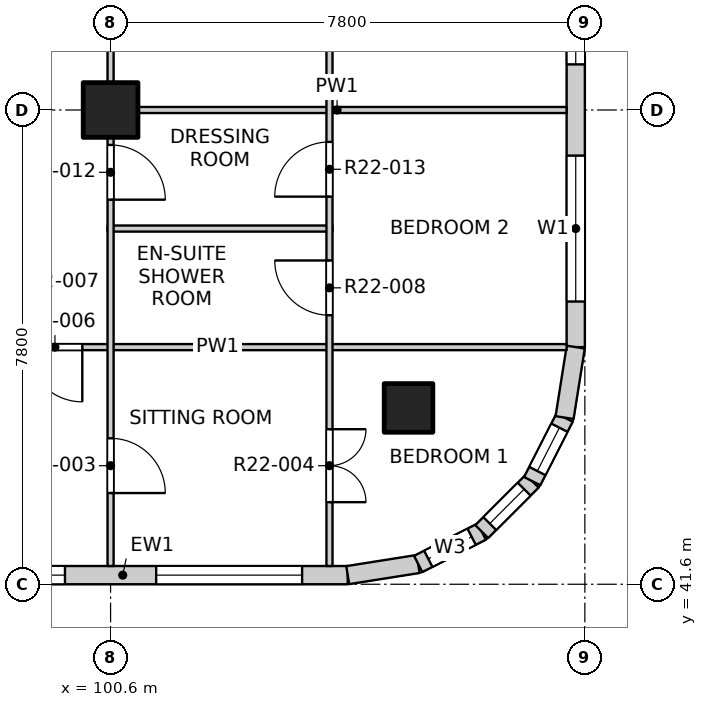
"""IFC4 building model, lengths in metres.
Left out: names, types, materials, properties, quantities, classifications, styles, units other than length and angle.
Written with IfcOpenShell. Run it as: python <this file> out.ifc"""

import sys

from ifc_helpers import new_model, si_unit, direction, frame, frame_2d, origin, origin_2d, place, context, subcontext, project, spatial, rectangle, extrude, element, fill, save


model = new_model("IFC4")
c1 = context("Model", 3, precision=1e-05, world=origin(), true_north=direction((0.0, 1.0)))
c2 = subcontext(c1, "Body", "Model", "MODEL_VIEW")
j1 = project(units=[si_unit("LENGTHUNIT", "METRE"), si_unit("PLANEANGLEUNIT", "RADIAN")], contexts=[c1])
p1 = place(None, origin())
s1 = spatial("IfcSite", under=j1, at=p1, CompositionType="ELEMENT")
p2 = place(p1, origin())
s2 = spatial("IfcBuilding", under=s1, at=p2, CompositionType="ELEMENT")
p3 = place(p2, frame((0.0, 0.0, 224.5)))
s3 = spatial("IfcBuildingStorey", under=s2, at=p3, CompositionType="ELEMENT", Elevation=224.5)
p4 = place(p3, frame((105.5, 44.5, -0.25), z_axis=(0.0, 0.0, 1.0), x_axis=(1.0, 0.0, 0.0)))
e1 = element("IfcColumn", 1, at=p4, inside=s3, PredefinedType="COLUMN", context=c2, shape_type="SweptSolid", body=[
    extrude(rectangle(XDim=0.8, YDim=0.8, at=origin_2d()), origin(), (0.0, 0.0, 1.0), 3.4),
])
p5 = place(p3, frame((100.6, 49.4, -0.25), z_axis=(0.0, 0.0, 1.0), x_axis=(1.0, 0.0, 0.0)))
e2 = element("IfcColumn", 2, at=p5, inside=s3, PredefinedType="COLUMN", context=c2, shape_type="SweptSolid", body=[
    extrude(rectangle(XDim=0.9, YDim=0.9, at=origin_2d()), origin(), (0.0, 0.0, 1.0), 3.4),
])
p6 = place(p3, frame((97.1, 41.75, 0.0), z_axis=(0.0, 0.0, 1.0), x_axis=(1.0, 0.0, 0.0)))
e3 = element("IfcWall", 3, at=p6, inside=s3, PredefinedType="SOLIDWALL", context=c2, shape_type="SweptSolid", body=[
    extrude(rectangle(XDim=7.4, YDim=0.3, at=frame_2d((3.7, 0.0))), origin(), (0.0, 0.0, 1.0), 2.7),
])
p7 = place(p6, frame((0.35, 0.0, 0.9)))
e4 = element("IfcOpeningElement", 4, at=p7, cuts=e3, PredefinedType="OPENING", context=c2, shape_type="SweptSolid", body=[
    extrude(rectangle(XDim=2.4, YDim=1.8, at=frame_2d((1.2, 0.9))), frame((0.0, 0.16, 0.0), z_axis=(0.0, -1.0, 0.0), x_axis=(1.0, 0.0, 0.0)), (0.0, 0.0, 1.0), 0.32),
])
p8 = place(p6, frame((4.25, 0.0, 0.9)))
e5 = element("IfcOpeningElement", 5, at=p8, cuts=e3, PredefinedType="OPENING", context=c2, shape_type="SweptSolid", body=[
    extrude(rectangle(XDim=2.4, YDim=1.8, at=frame_2d((1.2, 0.9))), frame((0.0, 0.16, 0.0), z_axis=(0.0, -1.0, 0.0), x_axis=(1.0, 0.0, 0.0)), (0.0, 0.0, 1.0), 0.32),
])
p9 = place(p3, frame((108.25, 45.5, 0.0), z_axis=(0.0, 0.0, 1.0), x_axis=(0.0, 1.0, 0.0)))
e6 = element("IfcWall", 6, at=p9, inside=s3, PredefinedType="SOLIDWALL", context=c2, shape_type="SweptSolid", body=[
    extrude(rectangle(XDim=7.4, YDim=0.3, at=frame_2d((3.7, 0.0))), origin(), (0.0, 0.0, 1.0), 2.7),
])
p10 = place(p9, frame((0.75, 0.0, 0.9)))
e7 = element("IfcOpeningElement", 7, at=p10, cuts=e6, PredefinedType="OPENING", context=c2, shape_type="SweptSolid", body=[
    extrude(rectangle(XDim=2.4, YDim=1.8, at=frame_2d((1.2, 0.9))), frame((0.0, 0.16, 0.0), z_axis=(0.0, -1.0, 0.0), x_axis=(1.0, 0.0, 0.0)), (0.0, 0.0, 1.0), 0.32),
])
p11 = place(p9, frame((4.65, 0.0, 0.9)))
e8 = element("IfcOpeningElement", 8, at=p11, cuts=e6, PredefinedType="OPENING", context=c2, shape_type="SweptSolid", body=[
    extrude(rectangle(XDim=2.4, YDim=1.8, at=frame_2d((1.2, 0.9))), frame((0.0, 0.16, 0.0), z_axis=(0.0, -1.0, 0.0), x_axis=(1.0, 0.0, 0.0)), (0.0, 0.0, 1.0), 0.32),
])
p12 = place(p3, frame((104.5, 41.75, 0.0), z_axis=(0.0, 0.0, 1.0), x_axis=(0.987678452879, 0.156496880861, 0.0)))
e9 = element("IfcWall", 9, at=p12, inside=s3, PredefinedType="SOLIDWALL", context=c2, shape_type="SweptSolid", body=[
    extrude(rectangle(XDim=1.173, YDim=0.3, at=frame_2d((0.586, 0.0))), origin(), (0.0, 0.0, 1.0), 2.7),
])
p13 = place(p3, frame((105.659, 41.934, 0.0), z_axis=(0.0, 0.0, 1.0), x_axis=(0.890988677504, 0.454025524128, 0.0)))
e10 = element("IfcWall", 10, at=p13, inside=s3, PredefinedType="SOLIDWALL", context=c2, shape_type="SweptSolid", body=[
    extrude(rectangle(XDim=1.173, YDim=0.3, at=frame_2d((0.587, 0.0))), origin(), (0.0, 0.0, 1.0), 2.7),
])
p14 = place(p13, frame((0.187, 0.0, 0.9)))
e11 = element("IfcOpeningElement", 11, at=p14, cuts=e10, PredefinedType="OPENING", context=c2, shape_type="SweptSolid", body=[
    extrude(rectangle(XDim=0.8, YDim=1.2, at=frame_2d((0.4, 0.6))), frame((0.0, 0.16, 0.0), z_axis=(0.0, -1.0, 0.0), x_axis=(1.0, 0.0, 0.0)), (0.0, 0.0, 1.0), 0.32),
])
p15 = place(p3, frame((106.704, 42.466, 0.0), z_axis=(0.0, 0.0, 1.0), x_axis=(0.707106781187, 0.707106781187, 0.0)))
e12 = element("IfcWall", 12, at=p15, inside=s3, PredefinedType="SOLIDWALL", context=c2, shape_type="SweptSolid", body=[
    extrude(rectangle(XDim=1.173, YDim=0.3, at=frame_2d((0.586, 0.0))), origin(), (0.0, 0.0, 1.0), 2.7),
])
p16 = place(p15, frame((0.187, 0.0, 0.9)))
e13 = element("IfcOpeningElement", 13, at=p16, cuts=e12, PredefinedType="OPENING", context=c2, shape_type="SweptSolid", body=[
    extrude(rectangle(XDim=0.8, YDim=1.2, at=frame_2d((0.4, 0.6))), frame((0.0, 0.16, 0.0), z_axis=(0.0, -1.0, 0.0), x_axis=(1.0, 0.0, 0.0)), (0.0, 0.0, 1.0), 0.32),
])
p17 = place(p3, frame((107.534, 43.296, 0.0), z_axis=(0.0, 0.0, 1.0), x_axis=(0.454025524128, 0.890988677504, 0.0)))
e14 = element("IfcWall", 14, at=p17, inside=s3, PredefinedType="SOLIDWALL", context=c2, shape_type="SweptSolid", body=[
    extrude(rectangle(XDim=1.173, YDim=0.3, at=frame_2d((0.587, 0.0))), origin(), (0.0, 0.0, 1.0), 2.7),
])
p18 = place(p17, frame((0.187, 0.0, 0.9)))
e15 = element("IfcOpeningElement", 15, at=p18, cuts=e14, PredefinedType="OPENING", context=c2, shape_type="SweptSolid", body=[
    extrude(rectangle(XDim=0.8, YDim=1.2, at=frame_2d((0.4, 0.6))), frame((0.0, 0.16, 0.0), z_axis=(0.0, -1.0, 0.0), x_axis=(1.0, 0.0, 0.0)), (0.0, 0.0, 1.0), 0.32),
])
p19 = place(p3, frame((108.066, 44.341, 0.0), z_axis=(0.0, 0.0, 1.0), x_axis=(0.156496880861, 0.987678452879, 0.0)))
e16 = element("IfcWall", 16, at=p19, inside=s3, PredefinedType="SOLIDWALL", context=c2, shape_type="SweptSolid", body=[
    extrude(rectangle(XDim=1.173, YDim=0.3, at=frame_2d((0.586, 0.0))), origin(), (0.0, 0.0, 1.0), 2.7),
])
p20 = place(p3, frame((96.625, 45.5, 0.0), z_axis=(0.0, 0.0, 1.0), x_axis=(1.0, 0.0, 0.0)))
e17 = element("IfcWall", 17, at=p20, inside=s3, PredefinedType="PARTITIONING", context=c2, shape_type="SweptSolid", body=[
    extrude(rectangle(XDim=11.475, YDim=0.1, at=frame_2d((5.738, 0.0))), origin(), (0.0, 0.0, 1.0), 3.15),
])
p21 = place(p20, frame((2.61, 0.0, 0.0)))
e18 = element("IfcOpeningElement", 18, at=p21, cuts=e17, PredefinedType="OPENING", context=c2, shape_type="SweptSolid", body=[
    extrude(rectangle(XDim=0.9, YDim=2.1, at=frame_2d((0.45, 1.05))), frame((0.0, 0.06, 0.0), z_axis=(0.0, -1.0, 0.0), x_axis=(1.0, 0.0, 0.0)), (0.0, 0.0, 1.0), 0.12),
])
p22 = place(p3, frame((100.55, 47.45, 0.0), z_axis=(0.0, 0.0, 1.0), x_axis=(1.0, 0.0, 0.0)))
e19 = element("IfcWall", 19, at=p22, inside=s3, PredefinedType="PARTITIONING", context=c2, shape_type="SweptSolid", body=[
    extrude(rectangle(XDim=3.7, YDim=0.1, at=frame_2d((1.85, 0.0))), origin(), (0.0, 0.0, 1.0), 3.15),
])
p23 = place(p3, frame((100.55, 49.4, 0.0), z_axis=(0.0, 0.0, 1.0), x_axis=(1.0, 0.0, 0.0)))
e20 = element("IfcWall", 20, at=p23, inside=s3, PredefinedType="PARTITIONING", context=c2, shape_type="SweptSolid", body=[
    extrude(rectangle(XDim=7.55, YDim=0.1, at=frame_2d((3.775, 0.0))), origin(), (0.0, 0.0, 1.0), 3.15),
])
p24 = place(p3, frame((100.6, 41.9, 0.0), z_axis=(0.0, 0.0, 1.0), x_axis=(0.0, 1.0, 0.0)))
e21 = element("IfcWall", 21, at=p24, inside=s3, PredefinedType="PARTITIONING", context=c2, shape_type="SweptSolid", body=[
    extrude(rectangle(XDim=46.2, YDim=0.1, at=frame_2d((23.1, 0.0))), origin(), (0.0, 0.0, 1.0), 3.15),
])
p25 = place(p24, frame((1.2, 0.0, 0.0)))
e22 = element("IfcOpeningElement", 22, at=p25, cuts=e21, PredefinedType="OPENING", context=c2, shape_type="SweptSolid", body=[
    extrude(rectangle(XDim=0.9, YDim=2.1, at=frame_2d((0.45, 1.05))), frame((0.0, 0.06, 0.0), z_axis=(0.0, -1.0, 0.0), x_axis=(1.0, 0.0, 0.0)), (0.0, 0.0, 1.0), 0.12),
])
p26 = place(p24, frame((6.025, 0.0, 0.0)))
e23 = element("IfcOpeningElement", 23, at=p26, cuts=e21, PredefinedType="OPENING", context=c2, shape_type="SweptSolid", body=[
    extrude(rectangle(XDim=0.9, YDim=2.1, at=frame_2d((0.45, 1.05))), frame((0.0, 0.06, 0.0), z_axis=(0.0, -1.0, 0.0), x_axis=(1.0, 0.0, 0.0)), (0.0, 0.0, 1.0), 0.12),
])
p27 = place(p24, frame((9.0, 0.0, 0.0)))
e24 = element("IfcOpeningElement", 24, at=p27, cuts=e21, PredefinedType="OPENING", context=c2, shape_type="SweptSolid", body=[
    extrude(rectangle(XDim=0.9, YDim=2.1, at=frame_2d((0.45, 1.05))), frame((0.0, 0.06, 0.0), z_axis=(0.0, -1.0, 0.0), x_axis=(1.0, 0.0, 0.0)), (0.0, 0.0, 1.0), 0.12),
])
p28 = place(p24, frame((12.9, 0.0, 0.0)))
e25 = element("IfcOpeningElement", 25, at=p28, cuts=e21, PredefinedType="OPENING", context=c2, shape_type="SweptSolid", body=[
    extrude(rectangle(XDim=0.9, YDim=2.1, at=frame_2d((0.45, 1.05))), frame((0.0, 0.06, 0.0), z_axis=(0.0, -1.0, 0.0), x_axis=(1.0, 0.0, 0.0)), (0.0, 0.0, 1.0), 0.12),
])
p29 = place(p24, frame((17.775, 0.0, 0.0)))
e26 = element("IfcOpeningElement", 26, at=p29, cuts=e21, PredefinedType="OPENING", context=c2, shape_type="SweptSolid", body=[
    extrude(rectangle(XDim=0.9, YDim=2.1, at=frame_2d((0.45, 1.05))), frame((0.0, 0.06, 0.0), z_axis=(0.0, -1.0, 0.0), x_axis=(1.0, 0.0, 0.0)), (0.0, 0.0, 1.0), 0.12),
])
p30 = place(p24, frame((21.625, 0.0, 0.0)))
e27 = element("IfcOpeningElement", 27, at=p30, cuts=e21, PredefinedType="OPENING", context=c2, shape_type="SweptSolid", body=[
    extrude(rectangle(XDim=0.9, YDim=2.1, at=frame_2d((0.45, 1.05))), frame((0.0, 0.06, 0.0), z_axis=(0.0, -1.0, 0.0), x_axis=(1.0, 0.0, 0.0)), (0.0, 0.0, 1.0), 0.12),
])
p31 = place(p24, frame((25.575, 0.0, 0.0)))
e28 = element("IfcOpeningElement", 28, at=p31, cuts=e21, PredefinedType="OPENING", context=c2, shape_type="SweptSolid", body=[
    extrude(rectangle(XDim=0.9, YDim=2.1, at=frame_2d((0.45, 1.05))), frame((0.0, 0.06, 0.0), z_axis=(0.0, -1.0, 0.0), x_axis=(1.0, 0.0, 0.0)), (0.0, 0.0, 1.0), 0.12),
])
p32 = place(p24, frame((28.5, 0.0, 0.0)))
e29 = element("IfcOpeningElement", 29, at=p32, cuts=e21, PredefinedType="OPENING", context=c2, shape_type="SweptSolid", body=[
    extrude(rectangle(XDim=0.9, YDim=2.1, at=frame_2d((0.45, 1.05))), frame((0.0, 0.06, 0.0), z_axis=(0.0, -1.0, 0.0), x_axis=(1.0, 0.0, 0.0)), (0.0, 0.0, 1.0), 0.12),
])
p33 = place(p24, frame((33.375, 0.0, 0.0)))
e30 = element("IfcOpeningElement", 30, at=p33, cuts=e21, PredefinedType="OPENING", context=c2, shape_type="SweptSolid", body=[
    extrude(rectangle(XDim=0.9, YDim=2.1, at=frame_2d((0.45, 1.05))), frame((0.0, 0.06, 0.0), z_axis=(0.0, -1.0, 0.0), x_axis=(1.0, 0.0, 0.0)), (0.0, 0.0, 1.0), 0.12),
])
p34 = place(p24, frame((36.3, 0.0, 0.0)))
e31 = element("IfcOpeningElement", 31, at=p34, cuts=e21, PredefinedType="OPENING", context=c2, shape_type="SweptSolid", body=[
    extrude(rectangle(XDim=0.9, YDim=2.1, at=frame_2d((0.45, 1.05))), frame((0.0, 0.06, 0.0), z_axis=(0.0, -1.0, 0.0), x_axis=(1.0, 0.0, 0.0)), (0.0, 0.0, 1.0), 0.12),
])
p35 = place(p24, frame((40.2, 0.0, 0.0)))
e32 = element("IfcOpeningElement", 32, at=p35, cuts=e21, PredefinedType="OPENING", context=c2, shape_type="SweptSolid", body=[
    extrude(rectangle(XDim=0.9, YDim=2.1, at=frame_2d((0.45, 1.05))), frame((0.0, 0.06, 0.0), z_axis=(0.0, -1.0, 0.0), x_axis=(1.0, 0.0, 0.0)), (0.0, 0.0, 1.0), 0.12),
])
p36 = place(p24, frame((44.1, 0.0, 0.0)))
e33 = element("IfcOpeningElement", 33, at=p36, cuts=e21, PredefinedType="OPENING", context=c2, shape_type="SweptSolid", body=[
    extrude(rectangle(XDim=0.9, YDim=2.1, at=frame_2d((0.45, 1.05))), frame((0.0, 0.06, 0.0), z_axis=(0.0, -1.0, 0.0), x_axis=(1.0, 0.0, 0.0)), (0.0, 0.0, 1.0), 0.12),
])
p37 = place(p3, frame((104.2, 41.9, 0.0), z_axis=(0.0, 0.0, 1.0), x_axis=(0.0, 1.0, 0.0)))
e34 = element("IfcWall", 34, at=p37, inside=s3, PredefinedType="PARTITIONING", context=c2, shape_type="SweptSolid", body=[
    extrude(rectangle(XDim=34.7, YDim=0.1, at=frame_2d((17.35, 0.0))), origin(), (0.0, 0.0, 1.0), 3.15),
])
p38 = place(p37, frame((1.05, 0.0, 0.0)))
e35 = element("IfcOpeningElement", 35, at=p38, cuts=e34, PredefinedType="OPENING", context=c2, shape_type="SweptSolid", body=[
    extrude(rectangle(XDim=1.2, YDim=2.1, at=frame_2d((0.6, 1.05))), frame((0.0, 0.06, 0.0), z_axis=(0.0, -1.0, 0.0), x_axis=(1.0, 0.0, 0.0)), (0.0, 0.0, 1.0), 0.12),
])
p39 = place(p37, frame((4.125, 0.0, 0.0)))
e36 = element("IfcOpeningElement", 36, at=p39, cuts=e34, PredefinedType="OPENING", context=c2, shape_type="SweptSolid", body=[
    extrude(rectangle(XDim=0.9, YDim=2.1, at=frame_2d((0.45, 1.05))), frame((0.0, 0.06, 0.0), z_axis=(0.0, -1.0, 0.0), x_axis=(1.0, 0.0, 0.0)), (0.0, 0.0, 1.0), 0.12),
])
p40 = place(p37, frame((6.075, 0.0, 0.0)))
e37 = element("IfcOpeningElement", 37, at=p40, cuts=e34, PredefinedType="OPENING", context=c2, shape_type="SweptSolid", body=[
    extrude(rectangle(XDim=0.9, YDim=2.1, at=frame_2d((0.45, 1.05))), frame((0.0, 0.06, 0.0), z_axis=(0.0, -1.0, 0.0), x_axis=(1.0, 0.0, 0.0)), (0.0, 0.0, 1.0), 0.12),
])
p41 = place(p37, frame((8.85, 0.0, 0.0)))
e38 = element("IfcOpeningElement", 38, at=p41, cuts=e34, PredefinedType="OPENING", context=c2, shape_type="SweptSolid", body=[
    extrude(rectangle(XDim=1.2, YDim=2.1, at=frame_2d((0.6, 1.05))), frame((0.0, 0.06, 0.0), z_axis=(0.0, -1.0, 0.0), x_axis=(1.0, 0.0, 0.0)), (0.0, 0.0, 1.0), 0.12),
])
p42 = place(p37, frame((12.75, 0.0, 0.0)))
e39 = element("IfcOpeningElement", 39, at=p42, cuts=e34, PredefinedType="OPENING", context=c2, shape_type="SweptSolid", body=[
    extrude(rectangle(XDim=1.2, YDim=2.1, at=frame_2d((0.6, 1.05))), frame((0.0, 0.06, 0.0), z_axis=(0.0, -1.0, 0.0), x_axis=(1.0, 0.0, 0.0)), (0.0, 0.0, 1.0), 0.12),
])
p43 = place(p37, frame((15.825, 0.0, 0.0)))
e40 = element("IfcOpeningElement", 40, at=p43, cuts=e34, PredefinedType="OPENING", context=c2, shape_type="SweptSolid", body=[
    extrude(rectangle(XDim=0.9, YDim=2.1, at=frame_2d((0.45, 1.05))), frame((0.0, 0.06, 0.0), z_axis=(0.0, -1.0, 0.0), x_axis=(1.0, 0.0, 0.0)), (0.0, 0.0, 1.0), 0.12),
])
p44 = place(p37, frame((17.775, 0.0, 0.0)))
e41 = element("IfcOpeningElement", 41, at=p44, cuts=e34, PredefinedType="OPENING", context=c2, shape_type="SweptSolid", body=[
    extrude(rectangle(XDim=0.9, YDim=2.1, at=frame_2d((0.45, 1.05))), frame((0.0, 0.06, 0.0), z_axis=(0.0, -1.0, 0.0), x_axis=(1.0, 0.0, 0.0)), (0.0, 0.0, 1.0), 0.12),
])
p45 = place(p37, frame((19.725, 0.0, 0.0)))
e42 = element("IfcOpeningElement", 42, at=p45, cuts=e34, PredefinedType="OPENING", context=c2, shape_type="SweptSolid", body=[
    extrude(rectangle(XDim=0.9, YDim=2.1, at=frame_2d((0.45, 1.05))), frame((0.0, 0.06, 0.0), z_axis=(0.0, -1.0, 0.0), x_axis=(1.0, 0.0, 0.0)), (0.0, 0.0, 1.0), 0.12),
])
p46 = place(p37, frame((21.675, 0.0, 0.0)))
e43 = element("IfcOpeningElement", 43, at=p46, cuts=e34, PredefinedType="OPENING", context=c2, shape_type="SweptSolid", body=[
    extrude(rectangle(XDim=0.9, YDim=2.1, at=frame_2d((0.45, 1.05))), frame((0.0, 0.06, 0.0), z_axis=(0.0, -1.0, 0.0), x_axis=(1.0, 0.0, 0.0)), (0.0, 0.0, 1.0), 0.12),
])
p47 = place(p37, frame((23.625, 0.0, 0.0)))
e44 = element("IfcOpeningElement", 44, at=p47, cuts=e34, PredefinedType="OPENING", context=c2, shape_type="SweptSolid", body=[
    extrude(rectangle(XDim=0.9, YDim=2.1, at=frame_2d((0.45, 1.05))), frame((0.0, 0.06, 0.0), z_axis=(0.0, -1.0, 0.0), x_axis=(1.0, 0.0, 0.0)), (0.0, 0.0, 1.0), 0.12),
])
p48 = place(p37, frame((25.575, 0.0, 0.0)))
e45 = element("IfcOpeningElement", 45, at=p48, cuts=e34, PredefinedType="OPENING", context=c2, shape_type="SweptSolid", body=[
    extrude(rectangle(XDim=0.9, YDim=2.1, at=frame_2d((0.45, 1.05))), frame((0.0, 0.06, 0.0), z_axis=(0.0, -1.0, 0.0), x_axis=(1.0, 0.0, 0.0)), (0.0, 0.0, 1.0), 0.12),
])
p49 = place(p37, frame((28.35, 0.0, 0.0)))
e46 = element("IfcOpeningElement", 46, at=p49, cuts=e34, PredefinedType="OPENING", context=c2, shape_type="SweptSolid", body=[
    extrude(rectangle(XDim=1.2, YDim=2.1, at=frame_2d((0.6, 1.05))), frame((0.0, 0.06, 0.0), z_axis=(0.0, -1.0, 0.0), x_axis=(1.0, 0.0, 0.0)), (0.0, 0.0, 1.0), 0.12),
])
p50 = place(p37, frame((31.425, 0.0, 0.0)))
e47 = element("IfcOpeningElement", 47, at=p50, cuts=e34, PredefinedType="OPENING", context=c2, shape_type="SweptSolid", body=[
    extrude(rectangle(XDim=0.9, YDim=2.1, at=frame_2d((0.45, 1.05))), frame((0.0, 0.06, 0.0), z_axis=(0.0, -1.0, 0.0), x_axis=(1.0, 0.0, 0.0)), (0.0, 0.0, 1.0), 0.12),
])
p51 = place(p37, frame((33.375, 0.0, 0.0)))
e48 = element("IfcOpeningElement", 48, at=p51, cuts=e34, PredefinedType="OPENING", context=c2, shape_type="SweptSolid", body=[
    extrude(rectangle(XDim=0.9, YDim=2.1, at=frame_2d((0.45, 1.05))), frame((0.0, 0.06, 0.0), z_axis=(0.0, -1.0, 0.0), x_axis=(1.0, 0.0, 0.0)), (0.0, 0.0, 1.0), 0.12),
])
p52 = place(p7, origin())
e49 = element("IfcWindow", 49, at=p52, inside=s3, PartitioningType="DOUBLE_PANEL_VERTICAL", PredefinedType="WINDOW", context=c2, shape_type="SweptSolid", body=[
    extrude(rectangle(XDim=2.4, YDim=1.8, at=frame_2d((1.2, 0.9))), frame((0.0, 0.03, 0.0), z_axis=(0.0, -1.0, 0.0), x_axis=(1.0, 0.0, 0.0)), (0.0, 0.0, 1.0), 0.06),
])
fill(e4, e49)
p53 = place(p8, origin())
e50 = element("IfcWindow", 50, at=p53, inside=s3, PartitioningType="DOUBLE_PANEL_VERTICAL", PredefinedType="WINDOW", context=c2, shape_type="SweptSolid", body=[
    extrude(rectangle(XDim=2.4, YDim=1.8, at=frame_2d((1.2, 0.9))), frame((0.0, 0.03, 0.0), z_axis=(0.0, -1.0, 0.0), x_axis=(1.0, 0.0, 0.0)), (0.0, 0.0, 1.0), 0.06),
])
fill(e5, e50)
p54 = place(p10, origin())
e51 = element("IfcWindow", 51, at=p54, inside=s3, PartitioningType="DOUBLE_PANEL_VERTICAL", PredefinedType="WINDOW", context=c2, shape_type="SweptSolid", body=[
    extrude(rectangle(XDim=2.4, YDim=1.8, at=frame_2d((1.2, 0.9))), frame((0.0, 0.03, 0.0), z_axis=(0.0, -1.0, 0.0), x_axis=(1.0, 0.0, 0.0)), (0.0, 0.0, 1.0), 0.06),
])
fill(e7, e51)
p55 = place(p11, origin())
e52 = element("IfcWindow", 52, at=p55, inside=s3, PartitioningType="DOUBLE_PANEL_VERTICAL", PredefinedType="WINDOW", context=c2, shape_type="SweptSolid", body=[
    extrude(rectangle(XDim=2.4, YDim=1.8, at=frame_2d((1.2, 0.9))), frame((0.0, 0.03, 0.0), z_axis=(0.0, -1.0, 0.0), x_axis=(1.0, 0.0, 0.0)), (0.0, 0.0, 1.0), 0.06),
])
fill(e8, e52)
p56 = place(p14, origin())
e53 = element("IfcWindow", 53, at=p56, inside=s3, PartitioningType="SINGLE_PANEL", PredefinedType="WINDOW", context=c2, shape_type="SweptSolid", body=[
    extrude(rectangle(XDim=0.8, YDim=1.2, at=frame_2d((0.4, 0.6))), frame((0.0, 0.03, 0.0), z_axis=(0.0, -1.0, 0.0), x_axis=(1.0, 0.0, 0.0)), (0.0, 0.0, 1.0), 0.06),
])
fill(e11, e53)
p57 = place(p16, origin())
e54 = element("IfcWindow", 54, at=p57, inside=s3, PartitioningType="SINGLE_PANEL", PredefinedType="WINDOW", context=c2, shape_type="SweptSolid", body=[
    extrude(rectangle(XDim=0.8, YDim=1.2, at=frame_2d((0.4, 0.6))), frame((0.0, 0.03, 0.0), z_axis=(0.0, -1.0, 0.0), x_axis=(1.0, 0.0, 0.0)), (0.0, 0.0, 1.0), 0.06),
])
fill(e13, e54)
p58 = place(p18, origin())
e55 = element("IfcWindow", 55, at=p58, inside=s3, PartitioningType="SINGLE_PANEL", PredefinedType="WINDOW", context=c2, shape_type="SweptSolid", body=[
    extrude(rectangle(XDim=0.8, YDim=1.2, at=frame_2d((0.4, 0.6))), frame((0.0, 0.03, 0.0), z_axis=(0.0, -1.0, 0.0), x_axis=(1.0, 0.0, 0.0)), (0.0, 0.0, 1.0), 0.06),
])
fill(e15, e55)
p59 = place(p25, origin())
e56 = element("IfcDoor", 56, at=p59, inside=s3, OperationType="SINGLE_SWING_RIGHT", PredefinedType="DOOR", context=c2, shape_type="SweptSolid", body=[
    extrude(rectangle(XDim=0.9, YDim=2.1, at=frame_2d((0.45, 1.05))), frame((0.0, 0.025, 0.0), z_axis=(0.0, -1.0, 0.0), x_axis=(1.0, 0.0, 0.0)), (0.0, 0.0, 1.0), 0.05),
])
fill(e22, e56)
p60 = place(p38, origin())
e57 = element("IfcDoor", 57, at=p60, inside=s3, OperationType="DOUBLE_DOOR_SINGLE_SWING", PredefinedType="DOOR", context=c2, shape_type="SweptSolid", body=[
    extrude(rectangle(XDim=1.2, YDim=2.1, at=frame_2d((0.6, 1.05))), frame((0.0, 0.025, 0.0), z_axis=(0.0, -1.0, 0.0), x_axis=(1.0, 0.0, 0.0)), (0.0, 0.0, 1.0), 0.05),
])
fill(e35, e57)
p61 = place(p21, origin())
e58 = element("IfcDoor", 58, at=p61, inside=s3, OperationType="SINGLE_SWING_LEFT", PredefinedType="DOOR", context=c2, shape_type="SweptSolid", body=[
    extrude(rectangle(XDim=0.9, YDim=2.1, at=frame_2d((0.45, 1.05))), frame((0.0, 0.025, 0.0), z_axis=(0.0, -1.0, 0.0), x_axis=(1.0, 0.0, 0.0)), (0.0, 0.0, 1.0), 0.05),
])
fill(e18, e58)
p62 = place(p39, origin())
e59 = element("IfcDoor", 59, at=p62, inside=s3, OperationType="SINGLE_SWING_RIGHT", PredefinedType="DOOR", context=c2, shape_type="SweptSolid", body=[
    extrude(rectangle(XDim=0.9, YDim=2.1, at=frame_2d((0.45, 1.05))), frame((0.0, 0.025, 0.0), z_axis=(0.0, -1.0, 0.0), x_axis=(1.0, 0.0, 0.0)), (0.0, 0.0, 1.0), 0.05),
])
fill(e36, e59)
p63 = place(p26, origin())
e60 = element("IfcDoor", 60, at=p63, inside=s3, OperationType="SINGLE_SWING_RIGHT", PredefinedType="DOOR", context=c2, shape_type="SweptSolid", body=[
    extrude(rectangle(XDim=0.9, YDim=2.1, at=frame_2d((0.45, 1.05))), frame((0.0, 0.025, 0.0), z_axis=(0.0, -1.0, 0.0), x_axis=(1.0, 0.0, 0.0)), (0.0, 0.0, 1.0), 0.05),
])
fill(e23, e60)
p64 = place(p40, origin())
e61 = element("IfcDoor", 61, at=p64, inside=s3, OperationType="SINGLE_SWING_LEFT", PredefinedType="DOOR", context=c2, shape_type="SweptSolid", body=[
    extrude(rectangle(XDim=0.9, YDim=2.1, at=frame_2d((0.45, 1.05))), frame((0.0, 0.025, 0.0), z_axis=(0.0, -1.0, 0.0), x_axis=(1.0, 0.0, 0.0)), (0.0, 0.0, 1.0), 0.05),
])
fill(e37, e61)
save(model, sys.argv[1])
